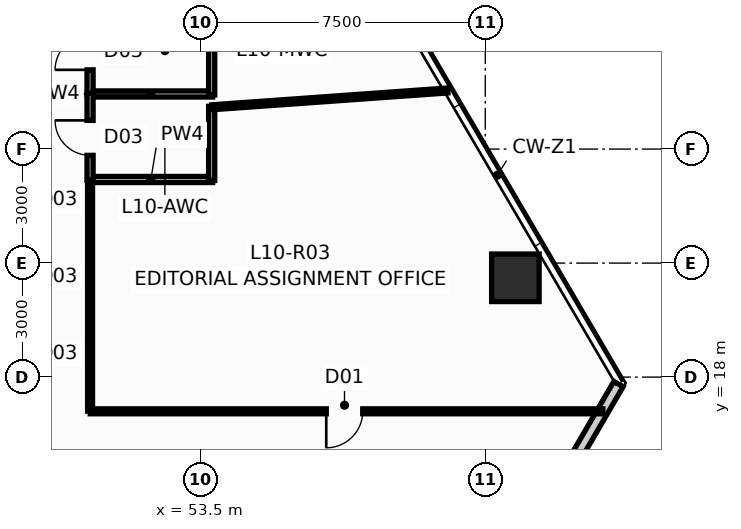
"""IFC4 building model, lengths in metres.
Left out: names, types, materials, properties, quantities, classifications, styles, units other than length and angle.
Written with IfcOpenShell. Run it as: python <this file> out.ifc"""

import sys

from ifc_helpers import new_model, si_unit, direction, frame, frame_2d, origin, origin_2d, place, context, subcontext, project, spatial, rectangle, hollow_rectangle, extrude, source, transform, mapped, element, fill, save


model = new_model("IFC4")
c1 = context("Model", 3, precision=1e-05, world=origin(), true_north=direction((0.0, 1.0)))
c2 = subcontext(c1, "Body", "Model", "MODEL_VIEW")
j1 = project(units=[si_unit("LENGTHUNIT", "METRE"), si_unit("PLANEANGLEUNIT", "RADIAN")], contexts=[c1])
p1 = place(None, origin())
s1 = spatial("IfcSite", under=j1, at=p1, CompositionType="ELEMENT")
p2 = place(p1, origin())
s2 = spatial("IfcBuilding", under=s1, at=p2, CompositionType="ELEMENT")
p3 = place(p2, frame((0.0, 0.0, 42.2)))
s3 = spatial("IfcBuildingStorey", under=s2, at=p3, CompositionType="ELEMENT", Elevation=42.2)
m1 = source(origin(), c2, "Body", "SweptSolid", [
    extrude(hollow_rectangle(XDim=1.25, YDim=1.25, WallThickness=0.07, at=origin_2d()), origin(), (0.0, 0.0, 1.0), 3.651),
])
p4 = place(p3, frame((61.792, 20.613, 0.0), z_axis=(-0.010431098089, -0.021530856313, 0.999713766245), x_axis=(0.899947055326, -0.435999194506, 0.0)))
e1 = element("IfcColumn", 1, at=p4, inside=s3, PredefinedType="COLUMN", context=c2, shape_type="MappedRepresentation", body=[
    mapped(m1, transform((0.0, 0.0, 0.0), scale=1.0)),
])
p5 = place(p3, frame((64.505, 17.817, 0.0), z_axis=(0.0, 0.0, 1.0), x_axis=(-0.503279106075, -0.864123915528, 0.0)))
e2 = element("IfcWall", 2, at=p5, inside=s3, PredefinedType="STANDARD", context=c2, shape_type="SweptSolid", body=[
    extrude(rectangle(XDim=15.903, YDim=0.28, at=frame_2d((7.952, 0.0))), origin(), (0.0, 0.0, 1.0), 3.4),
])
p6 = place(p5, frame((5.7, 0.0, 0.9)))
e3 = element("IfcOpeningElement", 3, at=p6, cuts=e2, PredefinedType="OPENING", context=c2, shape_type="SweptSolid", body=[
    extrude(rectangle(XDim=1.8, YDim=1.8, at=frame_2d((0.9, 0.9))), frame((0.0, 0.152, 0.0), z_axis=(0.0, -1.0, 0.0), x_axis=(1.0, 0.0, 0.0)), (0.0, 0.0, 1.0), 0.304),
])
for number, where, z_axis, x_axis in (
    (4, (50.575, 23.2, 0.0), (0.0, 0.0, 1.0), (1.0, 0.0, 0.0)),
    (5, (50.575, 25.45, 0.0), (0.0, 0.0, 1.0), (1.0, 0.0, 0.0)),
):
    element("IfcWall", number, at=place(p3, frame(where, z_axis=z_axis, x_axis=x_axis)), inside=s3, PredefinedType="PLUMBINGWALL", context=c2, shape_type="SweptSolid", body=[
        extrude(rectangle(XDim=3.25, YDim=0.16, at=frame_2d((1.625, 0.0))), origin(), (0.0, 0.0, 1.0), 3.4),
    ])
p7 = place(p3, frame((50.6, 25.425, 0.0), z_axis=(0.0, 0.0, 1.0), x_axis=(0.0, 1.0, 0.0)))
e6 = element("IfcWall", 6, at=p7, inside=s3, PredefinedType="PLUMBINGWALL", context=c2, shape_type="SweptSolid", body=[
    extrude(rectangle(XDim=2.3, YDim=0.16, at=frame_2d((1.15, 0.0))), origin(), (0.0, 0.0, 1.0), 3.4),
])
p8 = place(p7, frame((0.66, 0.0, 0.0)))
e7 = element("IfcOpeningElement", 7, at=p8, cuts=e6, PredefinedType="OPENING", context=c2, shape_type="SweptSolid", body=[
    extrude(rectangle(XDim=0.92, YDim=2.1, at=frame_2d((0.46, 1.05))), frame((0.0, 0.092, 0.0), z_axis=(0.0, -1.0, 0.0), x_axis=(1.0, 0.0, 0.0)), (0.0, 0.0, 1.0), 0.184),
])
p9 = place(p3, frame((50.6, 23.175, 0.0), z_axis=(0.0, 0.0, 1.0), x_axis=(0.0, 1.0, 0.0)))
e8 = element("IfcWall", 8, at=p9, inside=s3, PredefinedType="PLUMBINGWALL", context=c2, shape_type="SweptSolid", body=[
    extrude(rectangle(XDim=2.3, YDim=0.16, at=frame_2d((1.15, 0.0))), origin(), (0.0, 0.0, 1.0), 3.026),
])
p10 = place(p9, frame((0.66, 0.0, 0.0)))
e9 = element("IfcOpeningElement", 9, at=p10, cuts=e8, PredefinedType="OPENING", context=c2, shape_type="SweptSolid", body=[
    extrude(rectangle(XDim=0.92, YDim=2.1, at=frame_2d((0.46, 1.05))), frame((0.0, 0.092, 0.0), z_axis=(0.0, -1.0, 0.0), x_axis=(1.0, 0.0, 0.0)), (0.0, 0.0, 1.0), 0.184),
])
p11 = place(p3, frame((53.8, 25.425, 0.0), z_axis=(0.0, 0.0, 1.0), x_axis=(0.0, 1.0, 0.0)))
e10 = element("IfcWall", 10, at=p11, inside=s3, PredefinedType="PLUMBINGWALL", context=c2, shape_type="SweptSolid", body=[
    extrude(rectangle(XDim=2.3, YDim=0.16, at=frame_2d((1.15, 0.0))), origin(), (0.0, 0.0, 1.0), 3.026),
])
p12 = place(p3, frame((53.8, 23.175, 0.0), z_axis=(0.0, 0.0, 1.0), x_axis=(0.0, 1.0, 0.0)))
e11 = element("IfcWall", 11, at=p12, inside=s3, PredefinedType="PLUMBINGWALL", context=c2, shape_type="SweptSolid", body=[
    extrude(rectangle(XDim=1.95, YDim=0.16, at=frame_2d((0.975, 0.0))), origin(), (0.0, 0.0, 1.0), 3.4),
])
p13 = place(p3, frame((64.094, 17.1, 0.0), z_axis=(0.0, 0.0, 1.0), x_axis=(-1.0, 0.0, 0.0)))
e12 = element("IfcWall", 12, at=p13, inside=s3, PredefinedType="PARTITIONING", context=c2, shape_type="SweptSolid", body=[
    extrude(rectangle(XDim=13.489, YDim=0.13, at=frame_2d((6.744, 0.0))), origin(), (0.0, 0.0, 1.0), 3.4),
])
p14 = place(p13, frame((6.318, 0.0, 0.0)))
e13 = element("IfcOpeningElement", 13, at=p14, cuts=e12, PredefinedType="OPENING", context=c2, shape_type="SweptSolid", body=[
    extrude(rectangle(XDim=0.96, YDim=2.15, at=frame_2d((0.48, 1.075))), frame((0.0, 0.077, 0.0), z_axis=(0.0, -1.0, 0.0), x_axis=(1.0, 0.0, 0.0)), (0.0, 0.0, 1.0), 0.154),
])
p15 = place(p3, frame((53.805, 25.1, 0.0), z_axis=(0.0, 0.0, 1.0), x_axis=(0.997470434993, 0.071082566886, 0.0)))
e14 = element("IfcWall", 14, at=p15, inside=s3, PredefinedType="PARTITIONING", context=c2, shape_type="SweptSolid", body=[
    extrude(rectangle(XDim=6.223, YDim=0.13, at=frame_2d((3.112, 0.0))), origin(), (0.0, 0.0, 1.0), 3.4),
])
p16 = place(p3, frame((50.6, 17.105, 0.0), z_axis=(0.0, 0.0, 1.0), x_axis=(0.0, 1.0, 0.0)))
e15 = element("IfcWall", 15, at=p16, inside=s3, PredefinedType="PARTITIONING", context=c2, shape_type="SweptSolid", body=[
    extrude(rectangle(XDim=6.09, YDim=0.13, at=frame_2d((3.045, 0.0))), origin(), (0.0, 0.0, 1.0), 3.026),
])
p17 = place(p8, origin())
e16 = element("IfcDoor", 16, at=p17, inside=s3, OperationType="SINGLE_SWING_LEFT", PredefinedType="DOOR", context=c2, shape_type="SweptSolid", body=[
    extrude(rectangle(XDim=0.92, YDim=2.1, at=frame_2d((0.46, 1.05))), frame((0.0, 0.025, 0.0), z_axis=(0.0, -1.0, 0.0), x_axis=(1.0, 0.0, 0.0)), (0.0, 0.0, 1.0), 0.05),
])
fill(e7, e16)
p18 = place(p10, origin())
e17 = element("IfcDoor", 17, at=p18, inside=s3, OperationType="SINGLE_SWING_RIGHT", PredefinedType="DOOR", context=c2, shape_type="SweptSolid", body=[
    extrude(rectangle(XDim=0.92, YDim=2.1, at=frame_2d((0.46, 1.05))), frame((0.0, 0.025, 0.0), z_axis=(0.0, -1.0, 0.0), x_axis=(1.0, 0.0, 0.0)), (0.0, 0.0, 1.0), 0.05),
])
fill(e9, e17)
p19 = place(p14, origin())
e18 = element("IfcDoor", 18, at=p19, inside=s3, OperationType="SINGLE_SWING_RIGHT", PredefinedType="DOOR", context=c2, shape_type="SweptSolid", body=[
    extrude(rectangle(XDim=0.96, YDim=2.15, at=frame_2d((0.48, 1.075))), frame((0.0, 0.025, 0.0), z_axis=(0.0, -1.0, 0.0), x_axis=(1.0, 0.0, 0.0)), (0.0, 0.0, 1.0), 0.05),
])
fill(e13, e18)
save(model, sys.argv[1])
